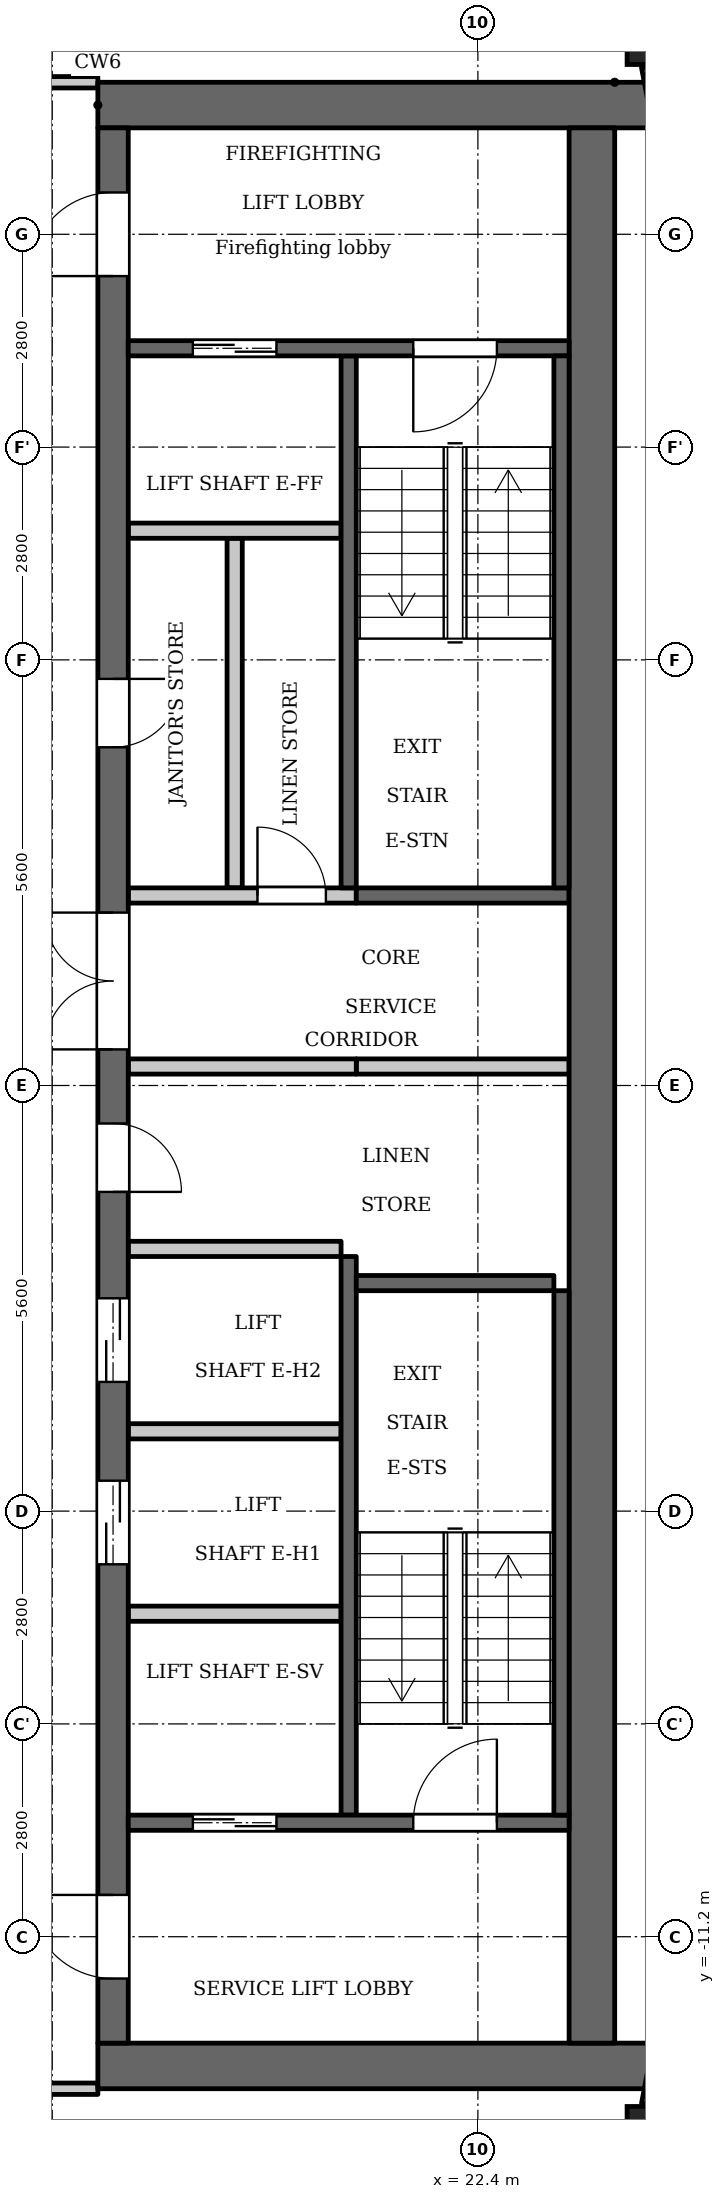
"""IFC4 building model, lengths in metres.
Left out: names, types, materials, properties, quantities, classifications, styles, units other than length and angle.
Written with IfcOpenShell. Run it as: python <this file> out.ifc"""

import sys

from ifc_helpers import new_model, si_unit, direction, frame, frame_2d, origin, origin_2d, place, context, subcontext, project, spatial, rectangle, extrude, element, fill, save


model = new_model("IFC4")
c1 = context("Model", 3, precision=1e-05, world=origin(), true_north=direction((0.0, 1.0)))
c2 = subcontext(c1, "Body", "Model", "MODEL_VIEW")
j1 = project(units=[si_unit("LENGTHUNIT", "METRE"), si_unit("PLANEANGLEUNIT", "RADIAN")], contexts=[c1])
p1 = place(None, origin())
s1 = spatial("IfcSite", under=j1, at=p1, CompositionType="ELEMENT")
p2 = place(p1, origin())
s2 = spatial("IfcBuilding", under=s1, at=p2, CompositionType="ELEMENT")
p3 = place(p2, frame((0.0, 0.0, 280.2)))
s3 = spatial("IfcBuildingStorey", under=s2, at=p3, CompositionType="ELEMENT", Elevation=280.2)
for number, where, z_axis, x_axis in (
    (1, (24.738, -13.809, 0.0), (0.0, 0.0, 1.0), (1.0, 0.0, 0.0)),
    (2, (24.738, 13.809, 0.0), (0.0, 0.0, 1.0), (1.0, 0.0, 0.0)),
):
    element("IfcColumn", number, at=place(p3, frame(where, z_axis=z_axis, x_axis=x_axis)), inside=s3, PredefinedType="COLUMN", context=c2, shape_type="SweptSolid", body=[
        extrude(rectangle(XDim=0.75, YDim=0.75, at=origin_2d()), origin(), (0.0, 0.0, 1.0), 3.5),
    ])
for number, where, z_axis, x_axis in (
    (3, (24.7, -13.42, 0.0), (0.0, 0.0, 1.0), (0.187, 0.982, 0.0)),
    (4, (25.053, 11.572, 0.0), (0.0, 0.0, 1.0), (-0.187, 0.982, 0.0)),
):
    element("IfcWall", number, at=place(p3, frame(where, z_axis=z_axis, x_axis=x_axis)), inside=s3, PredefinedType="SOLIDWALL", context=c2, shape_type="SweptSolid", body=[
        extrude(rectangle(XDim=1.881, YDim=0.3, at=frame_2d((0.941, 0.0))), origin(), (0.0, 0.0, 1.0), 2.5),
    ])
p4 = place(p3, frame((20.7, 2.6, 0.0), z_axis=(0.0, 0.0, 1.0), x_axis=(0.0, 1.0, 0.0)))
e5 = element("IfcWall", 5, at=p4, inside=s3, PredefinedType="SHEAR", context=c2, shape_type="SweptSolid", body=[
    extrude(rectangle(XDim=7.0, YDim=0.2, at=frame_2d((3.5, 0.0))), origin(), (0.0, 0.0, 1.0), 3.15),
])
p5 = place(p3, frame((20.7, -9.6, 0.0), z_axis=(0.0, 0.0, 1.0), x_axis=(0.0, 1.0, 0.0)))
e6 = element("IfcWall", 6, at=p5, inside=s3, PredefinedType="SHEAR", context=c2, shape_type="SweptSolid", body=[
    extrude(rectangle(XDim=7.35, YDim=0.2, at=frame_2d((3.675, 0.0))), origin(), (0.0, 0.0, 1.0), 3.15),
])
p6 = place(p3, frame((20.8, 2.5, 0.0), z_axis=(0.0, 0.0, 1.0), x_axis=(1.0, 0.0, 0.0)))
e7 = element("IfcWall", 7, at=p6, inside=s3, PredefinedType="SHEAR", context=c2, shape_type="SweptSolid", body=[
    extrude(rectangle(XDim=2.8, YDim=0.2, at=frame_2d((1.4, 0.0))), origin(), (0.0, 0.0, 1.0), 3.15),
])
p7 = place(p3, frame((20.8, 0.25, 0.0), z_axis=(0.0, 0.0, 1.0), x_axis=(1.0, 0.0, 0.0)))
e8 = element("IfcWall", 8, at=p7, inside=s3, PredefinedType="PARTITIONING", context=c2, shape_type="SweptSolid", body=[
    extrude(rectangle(XDim=2.8, YDim=0.2, at=frame_2d((1.4, 0.0))), origin(), (0.0, 0.0, 1.0), 3.15),
])
for number, where, z_axis, x_axis in (
    (9, (17.4, 12.9, 0.0), (0.0, 0.0, 1.0), (1.0, 0.0, 0.0)),
    (10, (17.4, -12.9, 0.0), (0.0, 0.0, 1.0), (1.0, 0.0, 0.0)),
):
    element("IfcWall", number, at=place(p3, frame(where, z_axis=z_axis, x_axis=x_axis)), inside=s3, PredefinedType="SHEAR", context=c2, shape_type="SweptSolid", body=[
        extrude(rectangle(XDim=7.32, YDim=0.6, at=frame_2d((3.66, 0.0))), origin(), (0.0, 0.0, 1.0), 3.15),
    ])
p8 = place(p3, frame((19.2, 2.6, 0.0), z_axis=(0.0, 0.0, 1.0), x_axis=(0.0, 1.0, 0.0)))
e11 = element("IfcWall", 11, at=p8, inside=s3, PredefinedType="PARTITIONING", context=c2, shape_type="SweptSolid", body=[
    extrude(rectangle(XDim=4.6, YDim=0.2, at=frame_2d((2.3, 0.0))), origin(), (0.0, 0.0, 1.0), 3.15),
])
p9 = place(p3, frame((17.6, -12.6, 0.0), z_axis=(0.0, 0.0, 1.0), x_axis=(0.0, 1.0, 0.0)))
e12 = element("IfcWall", 12, at=p9, inside=s3, PredefinedType="SHEAR", context=c2, shape_type="SweptSolid", body=[
    extrude(rectangle(XDim=25.2, YDim=0.4, at=frame_2d((12.6, 0.0))), origin(), (0.0, 0.0, 1.0), 3.15),
])
p10 = place(p9, frame((6.3, 0.0, 0.0)))
e13 = element("IfcOpeningElement", 13, at=p10, cuts=e12, PredefinedType="OPENING", context=c2, shape_type="SweptSolid", body=[
    extrude(rectangle(XDim=1.1, YDim=2.1, at=frame_2d((0.55, 1.05))), frame((0.0, 0.21, 0.0), z_axis=(0.0, -1.0, 0.0), x_axis=(1.0, 0.0, 0.0)), (0.0, 0.0, 1.0), 0.42),
])
p11 = place(p9, frame((8.7, 0.0, 0.0)))
e14 = element("IfcOpeningElement", 14, at=p11, cuts=e12, PredefinedType="OPENING", context=c2, shape_type="SweptSolid", body=[
    extrude(rectangle(XDim=1.1, YDim=2.1, at=frame_2d((0.55, 1.05))), frame((0.0, 0.21, 0.0), z_axis=(0.0, -1.0, 0.0), x_axis=(1.0, 0.0, 0.0)), (0.0, 0.0, 1.0), 0.42),
])
p12 = place(p9, frame((11.2, 0.0, 0.0)))
e15 = element("IfcOpeningElement", 15, at=p12, cuts=e12, PredefinedType="OPENING", context=c2, shape_type="SweptSolid", body=[
    extrude(rectangle(XDim=0.9, YDim=2.1, at=frame_2d((0.45, 1.05))), frame((0.0, 0.21, 0.0), z_axis=(0.0, -1.0, 0.0), x_axis=(1.0, 0.0, 0.0)), (0.0, 0.0, 1.0), 0.42),
])
p13 = place(p9, frame((17.05, 0.0, 0.0)))
e16 = element("IfcOpeningElement", 16, at=p13, cuts=e12, PredefinedType="OPENING", context=c2, shape_type="SweptSolid", body=[
    extrude(rectangle(XDim=0.9, YDim=2.1, at=frame_2d((0.45, 1.05))), frame((0.0, 0.21, 0.0), z_axis=(0.0, -1.0, 0.0), x_axis=(1.0, 0.0, 0.0)), (0.0, 0.0, 1.0), 0.42),
])
p14 = place(p9, frame((23.25, 0.0, 0.0)))
e17 = element("IfcOpeningElement", 17, at=p14, cuts=e12, PredefinedType="OPENING", context=c2, shape_type="SweptSolid", body=[
    extrude(rectangle(XDim=1.1, YDim=2.1, at=frame_2d((0.55, 1.05))), frame((0.0, 0.21, 0.0), z_axis=(0.0, -1.0, 0.0), x_axis=(1.0, 0.0, 0.0)), (0.0, 0.0, 1.0), 0.42),
])
p15 = place(p9, frame((0.85, 0.0, 0.0)))
e18 = element("IfcOpeningElement", 18, at=p15, cuts=e12, PredefinedType="OPENING", context=c2, shape_type="SweptSolid", body=[
    extrude(rectangle(XDim=1.1, YDim=2.1, at=frame_2d((0.55, 1.05))), frame((0.0, 0.21, 0.0), z_axis=(0.0, -1.0, 0.0), x_axis=(1.0, 0.0, 0.0)), (0.0, 0.0, 1.0), 0.42),
])
p16 = place(p9, frame((13.075, 0.0, 0.0)))
e19 = element("IfcOpeningElement", 19, at=p16, cuts=e12, PredefinedType="OPENING", context=c2, shape_type="SweptSolid", body=[
    extrude(rectangle(XDim=1.8, YDim=2.1, at=frame_2d((0.9, 1.05))), frame((0.0, 0.21, 0.0), z_axis=(0.0, -1.0, 0.0), x_axis=(1.0, 0.0, 0.0)), (0.0, 0.0, 1.0), 0.42),
])
p17 = place(p3, frame((23.9, -12.6, 0.0), z_axis=(0.0, 0.0, 1.0), x_axis=(0.0, 1.0, 0.0)))
e20 = element("IfcWall", 20, at=p17, inside=s3, PredefinedType="SHEAR", context=c2, shape_type="SweptSolid", body=[
    extrude(rectangle(XDim=25.2, YDim=0.6, at=frame_2d((12.6, 0.0))), origin(), (0.0, 0.0, 1.0), 3.15),
])
p18 = place(p3, frame((17.8, -9.7, 0.0), z_axis=(0.0, 0.0, 1.0), x_axis=(1.0, 0.0, 0.0)))
e21 = element("IfcWall", 21, at=p18, inside=s3, PredefinedType="SHEAR", context=c2, shape_type="SweptSolid", body=[
    extrude(rectangle(XDim=5.8, YDim=0.2, at=frame_2d((2.9, 0.0))), origin(), (0.0, 0.0, 1.0), 3.15),
])
p19 = place(p18, frame((0.85, 0.0, 0.0)))
e22 = element("IfcOpeningElement", 22, at=p19, cuts=e21, PredefinedType="OPENING", context=c2, shape_type="SweptSolid", body=[
    extrude(rectangle(XDim=1.1, YDim=2.1, at=frame_2d((0.55, 1.05))), frame((0.0, 0.11, 0.0), z_axis=(0.0, -1.0, 0.0), x_axis=(1.0, 0.0, 0.0)), (0.0, 0.0, 1.0), 0.22),
])
p20 = place(p18, frame((3.75, 0.0, 0.0)))
e23 = element("IfcOpeningElement", 23, at=p20, cuts=e21, PredefinedType="OPENING", context=c2, shape_type="SweptSolid", body=[
    extrude(rectangle(XDim=1.1, YDim=2.1, at=frame_2d((0.55, 1.05))), frame((0.0, 0.11, 0.0), z_axis=(0.0, -1.0, 0.0), x_axis=(1.0, 0.0, 0.0)), (0.0, 0.0, 1.0), 0.22),
])
for number, where, z_axis, x_axis in (
    (24, (17.8, -6.95, 0.0), (0.0, 0.0, 1.0), (1.0, 0.0, 0.0)),
    (25, (17.8, -4.55, 0.0), (0.0, 0.0, 1.0), (1.0, 0.0, 0.0)),
    (26, (17.8, -2.15, 0.0), (0.0, 0.0, 1.0), (1.0, 0.0, 0.0)),
):
    element("IfcWall", number, at=place(p3, frame(where, z_axis=z_axis, x_axis=x_axis)), inside=s3, PredefinedType="PARTITIONING", context=c2, shape_type="SweptSolid", body=[
        extrude(rectangle(XDim=2.8, YDim=0.2, at=frame_2d((1.4, 0.0))), origin(), (0.0, 0.0, 1.0), 3.15),
    ])
p21 = place(p3, frame((17.8, 0.25, 0.0), z_axis=(0.0, 0.0, 1.0), x_axis=(1.0, 0.0, 0.0)))
e27 = element("IfcWall", 27, at=p21, inside=s3, PredefinedType="PARTITIONING", context=c2, shape_type="SweptSolid", body=[
    extrude(rectangle(XDim=3.0, YDim=0.2, at=frame_2d((1.5, 0.0))), origin(), (0.0, 0.0, 1.0), 3.15),
])
p22 = place(p3, frame((17.8, 2.5, 0.0), z_axis=(0.0, 0.0, 1.0), x_axis=(1.0, 0.0, 0.0)))
e28 = element("IfcWall", 28, at=p22, inside=s3, PredefinedType="PARTITIONING", context=c2, shape_type="SweptSolid", body=[
    extrude(rectangle(XDim=3.0, YDim=0.2, at=frame_2d((1.5, 0.0))), origin(), (0.0, 0.0, 1.0), 3.15),
])
p23 = place(p22, frame((1.7, 0.0, 0.0)))
e29 = element("IfcOpeningElement", 29, at=p23, cuts=e28, PredefinedType="OPENING", context=c2, shape_type="SweptSolid", body=[
    extrude(rectangle(XDim=0.9, YDim=2.1, at=frame_2d((0.45, 1.05))), frame((0.0, 0.11, 0.0), z_axis=(0.0, -1.0, 0.0), x_axis=(1.0, 0.0, 0.0)), (0.0, 0.0, 1.0), 0.22),
])
p24 = place(p3, frame((17.8, 7.3, 0.0), z_axis=(0.0, 0.0, 1.0), x_axis=(1.0, 0.0, 0.0)))
e30 = element("IfcWall", 30, at=p24, inside=s3, PredefinedType="PARTITIONING", context=c2, shape_type="SweptSolid", body=[
    extrude(rectangle(XDim=2.8, YDim=0.2, at=frame_2d((1.4, 0.0))), origin(), (0.0, 0.0, 1.0), 3.15),
])
p25 = place(p3, frame((17.8, 9.7, 0.0), z_axis=(0.0, 0.0, 1.0), x_axis=(1.0, 0.0, 0.0)))
e31 = element("IfcWall", 31, at=p25, inside=s3, PredefinedType="SHEAR", context=c2, shape_type="SweptSolid", body=[
    extrude(rectangle(XDim=5.8, YDim=0.2, at=frame_2d((2.9, 0.0))), origin(), (0.0, 0.0, 1.0), 3.15),
])
p26 = place(p25, frame((0.85, 0.0, 0.0)))
e32 = element("IfcOpeningElement", 32, at=p26, cuts=e31, PredefinedType="OPENING", context=c2, shape_type="SweptSolid", body=[
    extrude(rectangle(XDim=1.1, YDim=2.1, at=frame_2d((0.55, 1.05))), frame((0.0, 0.11, 0.0), z_axis=(0.0, -1.0, 0.0), x_axis=(1.0, 0.0, 0.0)), (0.0, 0.0, 1.0), 0.22),
])
p27 = place(p25, frame((3.75, 0.0, 0.0)))
e33 = element("IfcOpeningElement", 33, at=p27, cuts=e31, PredefinedType="OPENING", context=c2, shape_type="SweptSolid", body=[
    extrude(rectangle(XDim=1.1, YDim=2.1, at=frame_2d((0.55, 1.05))), frame((0.0, 0.11, 0.0), z_axis=(0.0, -1.0, 0.0), x_axis=(1.0, 0.0, 0.0)), (0.0, 0.0, 1.0), 0.22),
])
p28 = place(p3, frame((23.5, 2.6, 0.0), z_axis=(0.0, 0.0, 1.0), x_axis=(0.0, 1.0, 0.0)))
e34 = element("IfcWall", 34, at=p28, inside=s3, PredefinedType="SHEAR", context=c2, shape_type="SweptSolid", body=[
    extrude(rectangle(XDim=7.0, YDim=0.2, at=frame_2d((3.5, 0.0))), origin(), (0.0, 0.0, 1.0), 3.15),
])
p29 = place(p3, frame((23.5, -9.6, 0.0), z_axis=(0.0, 0.0, 1.0), x_axis=(0.0, 1.0, 0.0)))
e35 = element("IfcWall", 35, at=p29, inside=s3, PredefinedType="SHEAR", context=c2, shape_type="SweptSolid", body=[
    extrude(rectangle(XDim=6.9, YDim=0.2, at=frame_2d((3.45, 0.0))), origin(), (0.0, 0.0, 1.0), 3.15),
])
p30 = place(p3, frame((20.8, -2.6, 0.0), z_axis=(0.0, 0.0, 1.0), x_axis=(1.0, 0.0, 0.0)))
e36 = element("IfcWall", 36, at=p30, inside=s3, PredefinedType="SHEAR", context=c2, shape_type="SweptSolid", body=[
    extrude(rectangle(XDim=2.6, YDim=0.2, at=frame_2d((1.3, 0.0))), origin(), (0.0, 0.0, 1.0), 3.15),
])
p31 = place(p3, frame((15.075, -13.2, 0.0), z_axis=(0.0, 0.0, 1.0), x_axis=(1.0, 0.0, 0.0)))
e37 = element("IfcWall", 37, at=p31, inside=s3, PredefinedType="PARTITIONING", context=c2, shape_type="SweptSolid", body=[
    extrude(rectangle(XDim=2.325, YDim=0.15, at=frame_2d((1.163, 0.0))), origin(), (0.0, 0.0, 1.0), 3.15),
])
p32 = place(p31, frame((0.575, 0.0, 0.0)))
e38 = element("IfcOpeningElement", 38, at=p32, cuts=e37, PredefinedType="OPENING", context=c2, shape_type="SweptSolid", body=[
    extrude(rectangle(XDim=1.0, YDim=2.1, at=frame_2d((0.5, 1.05))), frame((0.0, 0.085, 0.0), z_axis=(0.0, -1.0, 0.0), x_axis=(1.0, 0.0, 0.0)), (0.0, 0.0, 1.0), 0.17),
])
p33 = place(p3, frame((15.075, 13.2, 0.0), z_axis=(0.0, 0.0, 1.0), x_axis=(1.0, 0.0, 0.0)))
e39 = element("IfcWall", 39, at=p33, inside=s3, PredefinedType="PARTITIONING", context=c2, shape_type="SweptSolid", body=[
    extrude(rectangle(XDim=2.325, YDim=0.15, at=frame_2d((1.163, 0.0))), origin(), (0.0, 0.0, 1.0), 3.15),
])
p34 = place(p33, frame((0.675, 0.0, 0.0)))
e40 = element("IfcOpeningElement", 40, at=p34, cuts=e39, PredefinedType="OPENING", context=c2, shape_type="SweptSolid", body=[
    extrude(rectangle(XDim=1.0, YDim=2.1, at=frame_2d((0.5, 1.05))), frame((0.0, 0.085, 0.0), z_axis=(0.0, -1.0, 0.0), x_axis=(1.0, 0.0, 0.0)), (0.0, 0.0, 1.0), 0.17),
])
p35 = place(p19, origin())
e41 = element("IfcDoor", 41, at=p35, inside=s3, OperationType="DOUBLE_DOOR_SLIDING", PredefinedType="DOOR", context=c2, shape_type="SweptSolid", body=[
    extrude(rectangle(XDim=1.1, YDim=2.1, at=frame_2d((0.55, 1.05))), frame((0.0, 0.025, 0.0), z_axis=(0.0, -1.0, 0.0), x_axis=(1.0, 0.0, 0.0)), (0.0, 0.0, 1.0), 0.05),
])
fill(e22, e41)
p36 = place(p10, origin())
e42 = element("IfcDoor", 42, at=p36, inside=s3, OperationType="DOUBLE_DOOR_SLIDING", PredefinedType="DOOR", context=c2, shape_type="SweptSolid", body=[
    extrude(rectangle(XDim=1.1, YDim=2.1, at=frame_2d((0.55, 1.05))), frame((0.0, 0.025, 0.0), z_axis=(0.0, -1.0, 0.0), x_axis=(1.0, 0.0, 0.0)), (0.0, 0.0, 1.0), 0.05),
])
fill(e13, e42)
p37 = place(p11, origin())
e43 = element("IfcDoor", 43, at=p37, inside=s3, OperationType="DOUBLE_DOOR_SLIDING", PredefinedType="DOOR", context=c2, shape_type="SweptSolid", body=[
    extrude(rectangle(XDim=1.1, YDim=2.1, at=frame_2d((0.55, 1.05))), frame((0.0, 0.025, 0.0), z_axis=(0.0, -1.0, 0.0), x_axis=(1.0, 0.0, 0.0)), (0.0, 0.0, 1.0), 0.05),
])
fill(e14, e43)
p38 = place(p12, origin())
e44 = element("IfcDoor", 44, at=p38, inside=s3, OperationType="SINGLE_SWING_LEFT", PredefinedType="DOOR", context=c2, shape_type="SweptSolid", body=[
    extrude(rectangle(XDim=0.9, YDim=2.1, at=frame_2d((0.45, 1.05))), frame((0.0, 0.025, 0.0), z_axis=(0.0, -1.0, 0.0), x_axis=(1.0, 0.0, 0.0)), (0.0, 0.0, 1.0), 0.05),
])
fill(e15, e44)
p39 = place(p13, origin())
e45 = element("IfcDoor", 45, at=p39, inside=s3, OperationType="SINGLE_SWING_RIGHT", PredefinedType="DOOR", context=c2, shape_type="SweptSolid", body=[
    extrude(rectangle(XDim=0.9, YDim=2.1, at=frame_2d((0.45, 1.05))), frame((0.0, 0.025, 0.0), z_axis=(0.0, -1.0, 0.0), x_axis=(1.0, 0.0, 0.0)), (0.0, 0.0, 1.0), 0.05),
])
fill(e16, e45)
p40 = place(p23, origin())
e46 = element("IfcDoor", 46, at=p40, inside=s3, OperationType="SINGLE_SWING_RIGHT", PredefinedType="DOOR", context=c2, shape_type="SweptSolid", body=[
    extrude(rectangle(XDim=0.9, YDim=2.1, at=frame_2d((0.45, 1.05))), frame((0.0, 0.025, 0.0), z_axis=(0.0, -1.0, 0.0), x_axis=(1.0, 0.0, 0.0)), (0.0, 0.0, 1.0), 0.05),
])
fill(e29, e46)
p41 = place(p26, origin())
e47 = element("IfcDoor", 47, at=p41, inside=s3, OperationType="DOUBLE_DOOR_SLIDING", PredefinedType="DOOR", context=c2, shape_type="SweptSolid", body=[
    extrude(rectangle(XDim=1.1, YDim=2.1, at=frame_2d((0.55, 1.05))), frame((0.0, 0.025, 0.0), z_axis=(0.0, -1.0, 0.0), x_axis=(1.0, 0.0, 0.0)), (0.0, 0.0, 1.0), 0.05),
])
fill(e32, e47)
p42 = place(p14, origin())
e48 = element("IfcDoor", 48, at=p42, inside=s3, OperationType="SINGLE_SWING_RIGHT", PredefinedType="DOOR", context=c2, shape_type="SweptSolid", body=[
    extrude(rectangle(XDim=1.1, YDim=2.1, at=frame_2d((0.55, 1.05))), frame((0.0, 0.025, 0.0), z_axis=(0.0, -1.0, 0.0), x_axis=(1.0, 0.0, 0.0)), (0.0, 0.0, 1.0), 0.05),
])
fill(e17, e48)
p43 = place(p15, origin())
e49 = element("IfcDoor", 49, at=p43, inside=s3, OperationType="SINGLE_SWING_LEFT", PredefinedType="DOOR", context=c2, shape_type="SweptSolid", body=[
    extrude(rectangle(XDim=1.1, YDim=2.1, at=frame_2d((0.55, 1.05))), frame((0.0, 0.025, 0.0), z_axis=(0.0, -1.0, 0.0), x_axis=(1.0, 0.0, 0.0)), (0.0, 0.0, 1.0), 0.05),
])
fill(e18, e49)
p44 = place(p27, origin())
e50 = element("IfcDoor", 50, at=p44, inside=s3, OperationType="SINGLE_SWING_LEFT", PredefinedType="DOOR", context=c2, shape_type="SweptSolid", body=[
    extrude(rectangle(XDim=1.1, YDim=2.1, at=frame_2d((0.55, 1.05))), frame((0.0, 0.025, 0.0), z_axis=(0.0, -1.0, 0.0), x_axis=(1.0, 0.0, 0.0)), (0.0, 0.0, 1.0), 0.05),
])
fill(e33, e50)
p45 = place(p20, origin())
e51 = element("IfcDoor", 51, at=p45, inside=s3, OperationType="SINGLE_SWING_LEFT", PredefinedType="DOOR", context=c2, shape_type="SweptSolid", body=[
    extrude(rectangle(XDim=1.1, YDim=2.1, at=frame_2d((0.55, 1.05))), frame((0.0, 0.025, 0.0), z_axis=(0.0, -1.0, 0.0), x_axis=(1.0, 0.0, 0.0)), (0.0, 0.0, 1.0), 0.05),
])
fill(e23, e51)
p46 = place(p16, origin())
e52 = element("IfcDoor", 52, at=p46, inside=s3, OperationType="DOUBLE_DOOR_SINGLE_SWING", PredefinedType="DOOR", context=c2, shape_type="SweptSolid", body=[
    extrude(rectangle(XDim=1.8, YDim=2.1, at=frame_2d((0.9, 1.05))), frame((0.0, 0.025, 0.0), z_axis=(0.0, -1.0, 0.0), x_axis=(1.0, 0.0, 0.0)), (0.0, 0.0, 1.0), 0.05),
])
fill(e19, e52)
save(model, sys.argv[1])
